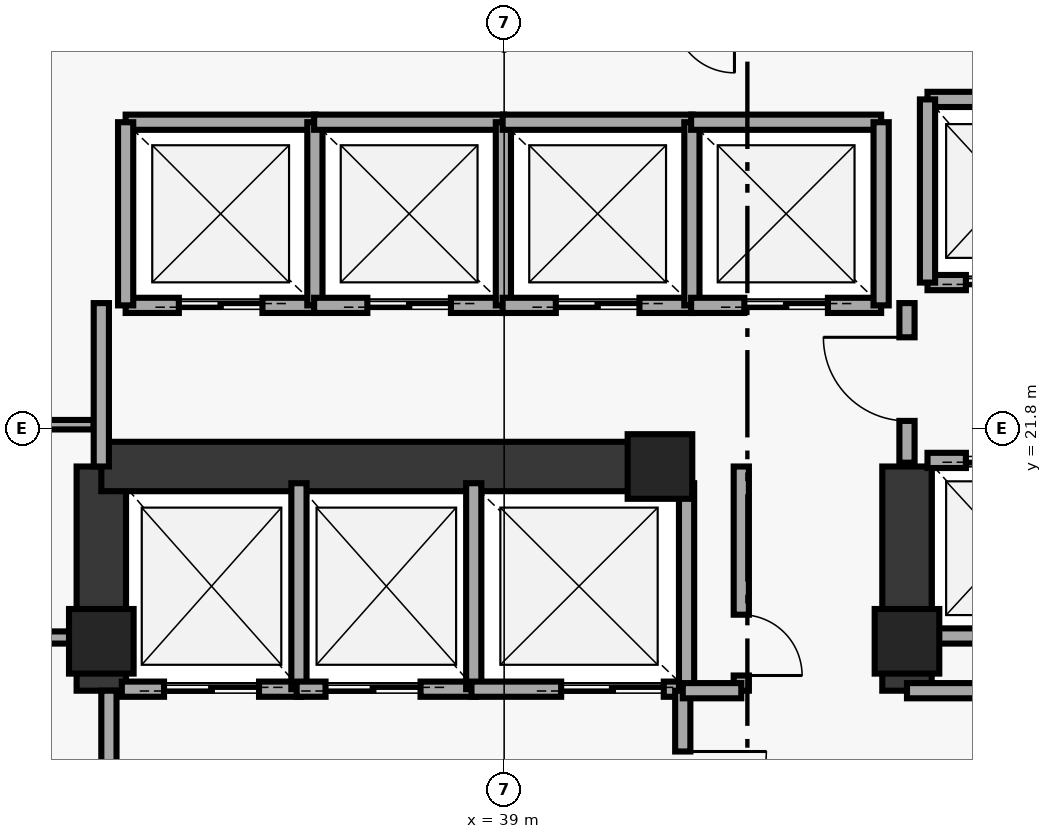
"""IFC4 building model, lengths in metres.
Left out: names, types, materials, properties, quantities, classifications, styles, units other than length and angle.
Written with IfcOpenShell. Run it as: python <this file> out.ifc"""

import sys

from ifc_helpers import new_model, si_unit, direction, frame, frame_2d, origin, origin_2d, place, context, subcontext, project, spatial, rectangle, extrude, element, fill, save


model = new_model("IFC4")
c1 = context("Model", 3, precision=1e-05, world=origin(), true_north=direction((0.0, 1.0)))
c2 = subcontext(c1, "Body", "Model", "MODEL_VIEW")
j1 = project(units=[si_unit("LENGTHUNIT", "METRE"), si_unit("PLANEANGLEUNIT", "RADIAN")], contexts=[c1])
p1 = place(None, origin())
s1 = spatial("IfcSite", under=j1, at=p1, CompositionType="ELEMENT")
p2 = place(p1, origin())
s2 = spatial("IfcBuilding", under=s1, at=p2, CompositionType="ELEMENT")
p3 = place(p2, frame((0.0, 0.0, 203.15)))
s3 = spatial("IfcBuildingStorey", under=s2, at=p3, CompositionType="ELEMENT", Elevation=203.15)
for number, where, z_axis, x_axis in (
    (1, (33.7, 19.0, 0.0), (0.0, 0.0, 1.0), (1.0, 0.0, 0.0)),
    (2, (41.05, 21.3, 0.0), (0.0, 0.0, 1.0), (1.0, 0.0, 0.0)),
    (3, (44.3, 19.0, 0.0), (0.0, 0.0, 1.0), (1.0, 0.0, 0.0)),
):
    element("IfcColumn", number, at=place(p3, frame(where, z_axis=z_axis, x_axis=x_axis)), inside=s3, PredefinedType="PILASTER", context=c2, shape_type="SweptSolid", body=[
        extrude(rectangle(XDim=0.85, YDim=0.85, at=origin_2d()), origin(), (0.0, 0.0, 1.0), 4.76),
    ])
for number, where, z_axis, x_axis in (
    (4, (33.7, 18.35, 0.0), (0.0, 0.0, 1.0), (0.0, 1.0, 0.0)),
    (5, (44.3, 18.35, 0.0), (0.0, 0.0, 1.0), (0.0, 1.0, 0.0)),
):
    element("IfcWall", number, at=place(p3, frame(where, z_axis=z_axis, x_axis=x_axis)), inside=s3, PredefinedType="SHEAR", context=c2, shape_type="SweptSolid", body=[
        extrude(rectangle(XDim=2.95, YDim=0.65, at=frame_2d((1.475, 0.0))), origin(), (0.0, 0.0, 1.0), 4.76),
    ])
p4 = place(p3, frame((33.7, 21.3, 0.0), z_axis=(0.0, 0.0, 1.0), x_axis=(1.0, 0.0, 0.0)))
e6 = element("IfcWall", 6, at=p4, inside=s3, PredefinedType="SHEAR", context=c2, shape_type="SweptSolid", body=[
    extrude(rectangle(XDim=7.55, YDim=0.65, at=frame_2d((3.775, 0.0))), origin(), (0.0, 0.0, 1.0), 4.76),
])
p5 = place(p3, frame((44.57, 23.72, 0.0), z_axis=(0.0, 0.0, 1.0), x_axis=(1.0, 0.0, 0.0)))
e7 = element("IfcWall", 7, at=p5, inside=s3, PredefinedType="SOLIDWALL", context=c2, shape_type="SweptSolid", body=[
    extrude(rectangle(XDim=2.11, YDim=0.2, at=frame_2d((1.055, 0.0))), origin(), (0.0, 0.0, 1.0), 4.76),
])
p6 = place(p5, frame((0.505, 0.0, 0.0)))
e8 = element("IfcOpeningElement", 8, at=p6, cuts=e7, PredefinedType="OPENING", context=c2, shape_type="SweptSolid", body=[
    extrude(rectangle(XDim=1.1, YDim=2.15, at=frame_2d((0.55, 1.075))), frame((0.0, 0.11, 0.0), z_axis=(0.0, -1.0, 0.0), x_axis=(1.0, 0.0, 0.0)), (0.0, 0.0, 1.0), 0.22),
])
p7 = place(p3, frame((44.57, 26.13, 0.0), z_axis=(0.0, 0.0, 1.0), x_axis=(1.0, 0.0, 0.0)))
e9 = element("IfcWall", 9, at=p7, inside=s3, PredefinedType="SOLIDWALL", context=c2, shape_type="SweptSolid", body=[
    extrude(rectangle(XDim=2.11, YDim=0.2, at=frame_2d((1.055, 0.0))), origin(), (0.0, 0.0, 1.0), 4.76),
])
p8 = place(p3, frame((44.57, 23.72, 0.0), z_axis=(0.0, 0.0, 1.0), x_axis=(0.0, 1.0, 0.0)))
e10 = element("IfcWall", 10, at=p8, inside=s3, PredefinedType="SOLIDWALL", context=c2, shape_type="SweptSolid", body=[
    extrude(rectangle(XDim=2.41, YDim=0.2, at=frame_2d((1.205, 0.0))), origin(), (0.0, 0.0, 1.0), 4.76),
])
p9 = place(p3, frame((44.57, 19.07, 0.0), z_axis=(0.0, 0.0, 1.0), x_axis=(1.0, 0.0, 0.0)))
e11 = element("IfcWall", 11, at=p9, inside=s3, PredefinedType="SOLIDWALL", context=c2, shape_type="SweptSolid", body=[
    extrude(rectangle(XDim=2.11, YDim=0.2, at=frame_2d((1.055, 0.0))), origin(), (0.0, 0.0, 1.0), 4.76),
])
p10 = place(p3, frame((44.57, 21.38, 0.0), z_axis=(0.0, 0.0, 1.0), x_axis=(1.0, 0.0, 0.0)))
e12 = element("IfcWall", 12, at=p10, inside=s3, PredefinedType="SOLIDWALL", context=c2, shape_type="SweptSolid", body=[
    extrude(rectangle(XDim=2.11, YDim=0.2, at=frame_2d((1.055, 0.0))), origin(), (0.0, 0.0, 1.0), 4.76),
])
p11 = place(p10, frame((0.505, 0.0, 0.0)))
e13 = element("IfcOpeningElement", 13, at=p11, cuts=e12, PredefinedType="OPENING", context=c2, shape_type="SweptSolid", body=[
    extrude(rectangle(XDim=1.1, YDim=2.15, at=frame_2d((0.55, 1.075))), frame((0.0, 0.11, 0.0), z_axis=(0.0, -1.0, 0.0), x_axis=(1.0, 0.0, 0.0)), (0.0, 0.0, 1.0), 0.22),
])
p12 = place(p3, frame((34.02, 23.42, 0.0), z_axis=(0.0, 0.0, 1.0), x_axis=(1.0, 0.0, 0.0)))
e14 = element("IfcWall", 14, at=p12, inside=s3, PredefinedType="SOLIDWALL", context=c2, shape_type="SweptSolid", body=[
    extrude(rectangle(XDim=2.5, YDim=0.2, at=frame_2d((1.25, 0.0))), origin(), (0.0, 0.0, 1.0), 4.76),
])
p13 = place(p12, frame((0.7, 0.0, 0.0)))
e15 = element("IfcOpeningElement", 15, at=p13, cuts=e14, PredefinedType="OPENING", context=c2, shape_type="SweptSolid", body=[
    extrude(rectangle(XDim=1.1, YDim=2.15, at=frame_2d((0.55, 1.075))), frame((0.0, 0.11, 0.0), z_axis=(0.0, -1.0, 0.0), x_axis=(1.0, 0.0, 0.0)), (0.0, 0.0, 1.0), 0.22),
])
p14 = place(p3, frame((34.02, 25.83, 0.0), z_axis=(0.0, 0.0, 1.0), x_axis=(1.0, 0.0, 0.0)))
e16 = element("IfcWall", 16, at=p14, inside=s3, PredefinedType="SOLIDWALL", context=c2, shape_type="SweptSolid", body=[
    extrude(rectangle(XDim=2.5, YDim=0.2, at=frame_2d((1.25, 0.0))), origin(), (0.0, 0.0, 1.0), 4.76),
])
for number, where, z_axis, x_axis in (
    (17, (34.02, 23.42, 0.0), (0.0, 0.0, 1.0), (0.0, 1.0, 0.0)),
    (18, (36.51, 23.42, 0.0), (0.0, 0.0, 1.0), (0.0, 1.0, 0.0)),
):
    element("IfcWall", number, at=place(p3, frame(where, z_axis=z_axis, x_axis=x_axis)), inside=s3, PredefinedType="SOLIDWALL", context=c2, shape_type="SweptSolid", body=[
        extrude(rectangle(XDim=2.41, YDim=0.2, at=frame_2d((1.205, 0.0))), origin(), (0.0, 0.0, 1.0), 4.76),
    ])
p15 = place(p3, frame((36.5, 23.42, 0.0), z_axis=(0.0, 0.0, 1.0), x_axis=(1.0, 0.0, 0.0)))
e19 = element("IfcWall", 19, at=p15, inside=s3, PredefinedType="SOLIDWALL", context=c2, shape_type="SweptSolid", body=[
    extrude(rectangle(XDim=2.5, YDim=0.2, at=frame_2d((1.25, 0.0))), origin(), (0.0, 0.0, 1.0), 4.76),
])
p16 = place(p15, frame((0.7, 0.0, 0.0)))
e20 = element("IfcOpeningElement", 20, at=p16, cuts=e19, PredefinedType="OPENING", context=c2, shape_type="SweptSolid", body=[
    extrude(rectangle(XDim=1.1, YDim=2.15, at=frame_2d((0.55, 1.075))), frame((0.0, 0.11, 0.0), z_axis=(0.0, -1.0, 0.0), x_axis=(1.0, 0.0, 0.0)), (0.0, 0.0, 1.0), 0.22),
])
p17 = place(p3, frame((36.5, 25.83, 0.0), z_axis=(0.0, 0.0, 1.0), x_axis=(1.0, 0.0, 0.0)))
e21 = element("IfcWall", 21, at=p17, inside=s3, PredefinedType="SOLIDWALL", context=c2, shape_type="SweptSolid", body=[
    extrude(rectangle(XDim=2.5, YDim=0.2, at=frame_2d((1.25, 0.0))), origin(), (0.0, 0.0, 1.0), 4.76),
])
p18 = place(p3, frame((38.99, 23.42, 0.0), z_axis=(0.0, 0.0, 1.0), x_axis=(0.0, 1.0, 0.0)))
e22 = element("IfcWall", 22, at=p18, inside=s3, PredefinedType="SOLIDWALL", context=c2, shape_type="SweptSolid", body=[
    extrude(rectangle(XDim=2.41, YDim=0.2, at=frame_2d((1.205, 0.0))), origin(), (0.0, 0.0, 1.0), 4.76),
])
p19 = place(p3, frame((38.98, 23.42, 0.0), z_axis=(0.0, 0.0, 1.0), x_axis=(1.0, 0.0, 0.0)))
e23 = element("IfcWall", 23, at=p19, inside=s3, PredefinedType="SOLIDWALL", context=c2, shape_type="SweptSolid", body=[
    extrude(rectangle(XDim=2.5, YDim=0.2, at=frame_2d((1.25, 0.0))), origin(), (0.0, 0.0, 1.0), 4.76),
])
p20 = place(p19, frame((0.7, 0.0, 0.0)))
e24 = element("IfcOpeningElement", 24, at=p20, cuts=e23, PredefinedType="OPENING", context=c2, shape_type="SweptSolid", body=[
    extrude(rectangle(XDim=1.1, YDim=2.15, at=frame_2d((0.55, 1.075))), frame((0.0, 0.11, 0.0), z_axis=(0.0, -1.0, 0.0), x_axis=(1.0, 0.0, 0.0)), (0.0, 0.0, 1.0), 0.22),
])
p21 = place(p3, frame((38.98, 25.83, 0.0), z_axis=(0.0, 0.0, 1.0), x_axis=(1.0, 0.0, 0.0)))
e25 = element("IfcWall", 25, at=p21, inside=s3, PredefinedType="SOLIDWALL", context=c2, shape_type="SweptSolid", body=[
    extrude(rectangle(XDim=2.5, YDim=0.2, at=frame_2d((1.25, 0.0))), origin(), (0.0, 0.0, 1.0), 4.76),
])
p22 = place(p3, frame((41.47, 23.42, 0.0), z_axis=(0.0, 0.0, 1.0), x_axis=(0.0, 1.0, 0.0)))
e26 = element("IfcWall", 26, at=p22, inside=s3, PredefinedType="SOLIDWALL", context=c2, shape_type="SweptSolid", body=[
    extrude(rectangle(XDim=2.41, YDim=0.2, at=frame_2d((1.205, 0.0))), origin(), (0.0, 0.0, 1.0), 4.76),
])
p23 = place(p3, frame((41.46, 23.42, 0.0), z_axis=(0.0, 0.0, 1.0), x_axis=(1.0, 0.0, 0.0)))
e27 = element("IfcWall", 27, at=p23, inside=s3, PredefinedType="SOLIDWALL", context=c2, shape_type="SweptSolid", body=[
    extrude(rectangle(XDim=2.5, YDim=0.2, at=frame_2d((1.25, 0.0))), origin(), (0.0, 0.0, 1.0), 4.76),
])
p24 = place(p23, frame((0.7, 0.0, 0.0)))
e28 = element("IfcOpeningElement", 28, at=p24, cuts=e27, PredefinedType="OPENING", context=c2, shape_type="SweptSolid", body=[
    extrude(rectangle(XDim=1.1, YDim=2.15, at=frame_2d((0.55, 1.075))), frame((0.0, 0.11, 0.0), z_axis=(0.0, -1.0, 0.0), x_axis=(1.0, 0.0, 0.0)), (0.0, 0.0, 1.0), 0.22),
])
p25 = place(p3, frame((41.46, 25.83, 0.0), z_axis=(0.0, 0.0, 1.0), x_axis=(1.0, 0.0, 0.0)))
e29 = element("IfcWall", 29, at=p25, inside=s3, PredefinedType="SOLIDWALL", context=c2, shape_type="SweptSolid", body=[
    extrude(rectangle(XDim=2.5, YDim=0.2, at=frame_2d((1.25, 0.0))), origin(), (0.0, 0.0, 1.0), 4.76),
])
p26 = place(p3, frame((43.96, 23.42, 0.0), z_axis=(0.0, 0.0, 1.0), x_axis=(0.0, 1.0, 0.0)))
e30 = element("IfcWall", 30, at=p26, inside=s3, PredefinedType="SOLIDWALL", context=c2, shape_type="SweptSolid", body=[
    extrude(rectangle(XDim=2.41, YDim=0.2, at=frame_2d((1.205, 0.0))), origin(), (0.0, 0.0, 1.0), 4.76),
])
p27 = place(p3, frame((33.97, 18.37, 0.0), z_axis=(0.0, 0.0, 1.0), x_axis=(1.0, 0.0, 0.0)))
e31 = element("IfcWall", 31, at=p27, inside=s3, PredefinedType="SOLIDWALL", context=c2, shape_type="SweptSolid", body=[
    extrude(rectangle(XDim=2.36, YDim=0.2, at=frame_2d((1.18, 0.0))), origin(), (0.0, 0.0, 1.0), 4.76),
])
p28 = place(p27, frame((0.555, 0.0, 0.0)))
e32 = element("IfcOpeningElement", 32, at=p28, cuts=e31, PredefinedType="OPENING", context=c2, shape_type="SweptSolid", body=[
    extrude(rectangle(XDim=1.25, YDim=2.2, at=frame_2d((0.625, 1.1))), frame((0.0, 0.11, 0.0), z_axis=(0.0, -1.0, 0.0), x_axis=(1.0, 0.0, 0.0)), (0.0, 0.0, 1.0), 0.22),
])
p29 = place(p3, frame((36.3, 18.37, 0.0), z_axis=(0.0, 0.0, 1.0), x_axis=(0.0, 1.0, 0.0)))
e33 = element("IfcWall", 33, at=p29, inside=s3, PredefinedType="SOLIDWALL", context=c2, shape_type="SweptSolid", body=[
    extrude(rectangle(XDim=2.71, YDim=0.2, at=frame_2d((1.355, 0.0))), origin(), (0.0, 0.0, 1.0), 4.76),
])
p30 = place(p3, frame((36.27, 18.37, 0.0), z_axis=(0.0, 0.0, 1.0), x_axis=(1.0, 0.0, 0.0)))
e34 = element("IfcWall", 34, at=p30, inside=s3, PredefinedType="SOLIDWALL", context=c2, shape_type="SweptSolid", body=[
    extrude(rectangle(XDim=2.36, YDim=0.2, at=frame_2d((1.18, 0.0))), origin(), (0.0, 0.0, 1.0), 4.76),
])
p31 = place(p30, frame((0.38, 0.0, 0.0)))
e35 = element("IfcOpeningElement", 35, at=p31, cuts=e34, PredefinedType="OPENING", context=c2, shape_type="SweptSolid", body=[
    extrude(rectangle(XDim=1.25, YDim=2.2, at=frame_2d((0.625, 1.1))), frame((0.0, 0.11, 0.0), z_axis=(0.0, -1.0, 0.0), x_axis=(1.0, 0.0, 0.0)), (0.0, 0.0, 1.0), 0.22),
])
p32 = place(p3, frame((38.6, 18.37, 0.0), z_axis=(0.0, 0.0, 1.0), x_axis=(0.0, 1.0, 0.0)))
e36 = element("IfcWall", 36, at=p32, inside=s3, PredefinedType="SOLIDWALL", context=c2, shape_type="SweptSolid", body=[
    extrude(rectangle(XDim=2.71, YDim=0.2, at=frame_2d((1.355, 0.0))), origin(), (0.0, 0.0, 1.0), 4.76),
])
p33 = place(p3, frame((38.57, 18.37, 0.0), z_axis=(0.0, 0.0, 1.0), x_axis=(1.0, 0.0, 0.0)))
e37 = element("IfcWall", 37, at=p33, inside=s3, PredefinedType="SOLIDWALL", context=c2, shape_type="SweptSolid", body=[
    extrude(rectangle(XDim=2.83, YDim=0.2, at=frame_2d((1.415, 0.0))), origin(), (0.0, 0.0, 1.0), 4.76),
])
p34 = place(p33, frame((1.18, 0.0, 0.0)))
e38 = element("IfcOpeningElement", 38, at=p34, cuts=e37, PredefinedType="OPENING", context=c2, shape_type="SweptSolid", body=[
    extrude(rectangle(XDim=1.35, YDim=2.18, at=frame_2d((0.675, 1.09))), frame((0.0, 0.11, 0.0), z_axis=(0.0, -1.0, 0.0), x_axis=(1.0, 0.0, 0.0)), (0.0, 0.0, 1.0), 0.22),
])
p35 = place(p3, frame((41.4, 18.37, 0.0), z_axis=(0.0, 0.0, 1.0), x_axis=(0.0, 1.0, 0.0)))
e39 = element("IfcWall", 39, at=p35, inside=s3, PredefinedType="SOLIDWALL", context=c2, shape_type="SweptSolid", body=[
    extrude(rectangle(XDim=2.71, YDim=0.2, at=frame_2d((1.355, 0.0))), origin(), (0.0, 0.0, 1.0), 4.76),
])
p36 = place(p3, frame((29.05, 19.05, 0.0), z_axis=(0.0, 0.0, 1.0), x_axis=(1.0, 0.0, 0.0)))
e40 = element("IfcWall", 40, at=p36, inside=s3, PredefinedType="PARTITIONING", context=c2, shape_type="SweptSolid", body=[
    extrude(rectangle(XDim=4.65, YDim=0.16, at=frame_2d((2.325, 0.0))), origin(), (0.0, 0.0, 1.0), 4.76),
])
p37 = place(p3, frame((33.6, 21.85, 0.0), z_axis=(0.0, 0.0, 1.0), x_axis=(-1.0, 0.0, 0.0)))
e41 = element("IfcWall", 41, at=p37, inside=s3, PredefinedType="PARTITIONING", context=c2, shape_type="SweptSolid", body=[
    extrude(rectangle(XDim=4.55, YDim=0.125, at=frame_2d((2.275, 0.0))), origin(), (0.0, 0.0, 1.0), 4.76),
])
p38 = place(p37, frame((3.2, 0.0, 0.0)))
e42 = element("IfcOpeningElement", 42, at=p38, cuts=e41, PredefinedType="OPENING", context=c2, shape_type="SweptSolid", body=[
    extrude(rectangle(XDim=0.8, YDim=2.05, at=frame_2d((0.4, 1.025))), frame((0.0, 0.073, 0.0), z_axis=(0.0, -1.0, 0.0), x_axis=(1.0, 0.0, 0.0)), (0.0, 0.0, 1.0), 0.145),
])
p39 = place(p37, frame((1.0, 0.0, 0.0)))
e43 = element("IfcOpeningElement", 43, at=p39, cuts=e41, PredefinedType="OPENING", context=c2, shape_type="SweptSolid", body=[
    extrude(rectangle(XDim=0.8, YDim=2.05, at=frame_2d((0.4, 1.025))), frame((0.0, 0.073, 0.0), z_axis=(0.0, -1.0, 0.0), x_axis=(1.0, 0.0, 0.0)), (0.0, 0.0, 1.0), 0.145),
])
p40 = place(p3, frame((33.7, 21.3, 0.0), z_axis=(0.0, 0.0, 1.0), x_axis=(0.0, 1.0, 0.0)))
e44 = element("IfcWall", 44, at=p40, inside=s3, PredefinedType="SOLIDWALL", context=c2, shape_type="SweptSolid", body=[
    extrude(rectangle(XDim=2.15, YDim=0.2, at=frame_2d((1.075, 0.0))), origin(), (0.0, 0.0, 1.0), 4.145),
])
p41 = place(p3, frame((44.3, 21.35, 0.0), z_axis=(0.0, 0.0, 1.0), x_axis=(0.0, 1.0, 0.0)))
e45 = element("IfcWall", 45, at=p41, inside=s3, PredefinedType="SOLIDWALL", context=c2, shape_type="SweptSolid", body=[
    extrude(rectangle(XDim=2.1, YDim=0.2, at=frame_2d((1.05, 0.0))), origin(), (0.0, 0.0, 1.0), 4.145),
])
p42 = place(p41, frame((0.55, 0.0, 0.0)))
e46 = element("IfcOpeningElement", 46, at=p42, cuts=e45, PredefinedType="OPENING", context=c2, shape_type="SweptSolid", body=[
    extrude(rectangle(XDim=1.1, YDim=2.15, at=frame_2d((0.55, 1.075))), frame((0.0, 0.11, 0.0), z_axis=(0.0, -1.0, 0.0), x_axis=(1.0, 0.0, 0.0)), (0.0, 0.0, 1.0), 0.22),
])
p43 = place(p3, frame((33.8, 15.55, 0.0), z_axis=(0.0, 0.0, 1.0), x_axis=(0.0, 1.0, 0.0)))
e47 = element("IfcWall", 47, at=p43, inside=s3, PredefinedType="SOLIDWALL", context=c2, shape_type="SweptSolid", body=[
    extrude(rectangle(XDim=2.8, YDim=0.2, at=frame_2d((1.4, 0.0))), origin(), (0.0, 0.0, 1.0), 4.76),
])
p44 = place(p3, frame((41.35, 15.55, 0.0), z_axis=(0.0, 0.0, 1.0), x_axis=(0.0, 1.0, 0.0)))
e48 = element("IfcWall", 48, at=p44, inside=s3, PredefinedType="SOLIDWALL", context=c2, shape_type="SweptSolid", body=[
    extrude(rectangle(XDim=2.8, YDim=0.2, at=frame_2d((1.4, 0.0))), origin(), (0.0, 0.0, 1.0), 4.76),
])
p45 = place(p44, frame((0.9, 0.0, 0.0)))
e49 = element("IfcOpeningElement", 49, at=p45, cuts=e48, PredefinedType="OPENING", context=c2, shape_type="SweptSolid", body=[
    extrude(rectangle(XDim=1.1, YDim=2.15, at=frame_2d((0.55, 1.075))), frame((0.0, 0.11, 0.0), z_axis=(0.0, -1.0, 0.0), x_axis=(1.0, 0.0, 0.0)), (0.0, 0.0, 1.0), 0.22),
])
p46 = place(p3, frame((44.3, 18.35, 0.0), z_axis=(0.0, 0.0, 1.0), x_axis=(1.0, 0.0, 0.0)))
e50 = element("IfcWall", 50, at=p46, inside=s3, PredefinedType="SOLIDWALL", context=c2, shape_type="SweptSolid", body=[
    extrude(rectangle(XDim=1.55, YDim=0.2, at=frame_2d((0.775, 0.0))), origin(), (0.0, 0.0, 1.0), 4.76),
])
p47 = place(p3, frame((42.12, 18.35, 0.0), z_axis=(0.0, 0.0, 1.0), x_axis=(0.0, 1.0, 0.0)))
e51 = element("IfcWall", 51, at=p47, inside=s3, PredefinedType="SOLIDWALL", context=c2, shape_type="SweptSolid", body=[
    extrude(rectangle(XDim=2.95, YDim=0.2, at=frame_2d((1.475, 0.0))), origin(), (0.0, 0.0, 1.0), 4.76),
])
p48 = place(p47, frame((0.2, 0.0, 0.0)))
e52 = element("IfcOpeningElement", 52, at=p48, cuts=e51, PredefinedType="OPENING", context=c2, shape_type="SweptSolid", body=[
    extrude(rectangle(XDim=0.8, YDim=2.05, at=frame_2d((0.4, 1.025))), frame((0.0, 0.11, 0.0), z_axis=(0.0, -1.0, 0.0), x_axis=(1.0, 0.0, 0.0)), (0.0, 0.0, 1.0), 0.22),
])
p49 = place(p3, frame((41.35, 18.35, 0.0), z_axis=(0.0, 0.0, 1.0), x_axis=(1.0, 0.0, 0.0)))
e53 = element("IfcWall", 53, at=p49, inside=s3, PredefinedType="SOLIDWALL", context=c2, shape_type="SweptSolid", body=[
    extrude(rectangle(XDim=0.77, YDim=0.2, at=frame_2d((0.385, 0.0))), origin(), (0.0, 0.0, 1.0), 4.76),
])
p50 = place(p6, origin())
e54 = element("IfcDoor", 54, at=p50, inside=s3, OperationType="DOUBLE_DOOR_SLIDING", PredefinedType="DOOR", context=c2, shape_type="SweptSolid", body=[
    extrude(rectangle(XDim=1.1, YDim=2.15, at=frame_2d((0.55, 1.075))), frame((0.0, 0.025, 0.0), z_axis=(0.0, -1.0, 0.0), x_axis=(1.0, 0.0, 0.0)), (0.0, 0.0, 1.0), 0.05),
])
fill(e8, e54)
p51 = place(p11, origin())
e55 = element("IfcDoor", 55, at=p51, inside=s3, OperationType="DOUBLE_DOOR_SLIDING", PredefinedType="DOOR", context=c2, shape_type="SweptSolid", body=[
    extrude(rectangle(XDim=1.1, YDim=2.15, at=frame_2d((0.55, 1.075))), frame((0.0, 0.025, 0.0), z_axis=(0.0, -1.0, 0.0), x_axis=(1.0, 0.0, 0.0)), (0.0, 0.0, 1.0), 0.05),
])
fill(e13, e55)
p52 = place(p13, origin())
e56 = element("IfcDoor", 56, at=p52, inside=s3, OperationType="DOUBLE_DOOR_SLIDING", PredefinedType="DOOR", context=c2, shape_type="SweptSolid", body=[
    extrude(rectangle(XDim=1.1, YDim=2.15, at=frame_2d((0.55, 1.075))), frame((0.0, 0.025, 0.0), z_axis=(0.0, -1.0, 0.0), x_axis=(1.0, 0.0, 0.0)), (0.0, 0.0, 1.0), 0.05),
])
fill(e15, e56)
p53 = place(p16, origin())
e57 = element("IfcDoor", 57, at=p53, inside=s3, OperationType="DOUBLE_DOOR_SLIDING", PredefinedType="DOOR", context=c2, shape_type="SweptSolid", body=[
    extrude(rectangle(XDim=1.1, YDim=2.15, at=frame_2d((0.55, 1.075))), frame((0.0, 0.025, 0.0), z_axis=(0.0, -1.0, 0.0), x_axis=(1.0, 0.0, 0.0)), (0.0, 0.0, 1.0), 0.05),
])
fill(e20, e57)
p54 = place(p20, origin())
e58 = element("IfcDoor", 58, at=p54, inside=s3, OperationType="DOUBLE_DOOR_SLIDING", PredefinedType="DOOR", context=c2, shape_type="SweptSolid", body=[
    extrude(rectangle(XDim=1.1, YDim=2.15, at=frame_2d((0.55, 1.075))), frame((0.0, 0.025, 0.0), z_axis=(0.0, -1.0, 0.0), x_axis=(1.0, 0.0, 0.0)), (0.0, 0.0, 1.0), 0.05),
])
fill(e24, e58)
p55 = place(p24, origin())
e59 = element("IfcDoor", 59, at=p55, inside=s3, OperationType="DOUBLE_DOOR_SLIDING", PredefinedType="DOOR", context=c2, shape_type="SweptSolid", body=[
    extrude(rectangle(XDim=1.1, YDim=2.15, at=frame_2d((0.55, 1.075))), frame((0.0, 0.025, 0.0), z_axis=(0.0, -1.0, 0.0), x_axis=(1.0, 0.0, 0.0)), (0.0, 0.0, 1.0), 0.05),
])
fill(e28, e59)
p56 = place(p28, origin())
e60 = element("IfcDoor", 60, at=p56, inside=s3, OperationType="DOUBLE_DOOR_SLIDING", PredefinedType="DOOR", context=c2, shape_type="SweptSolid", body=[
    extrude(rectangle(XDim=1.25, YDim=2.2, at=frame_2d((0.625, 1.1))), frame((0.0, 0.025, 0.0), z_axis=(0.0, -1.0, 0.0), x_axis=(1.0, 0.0, 0.0)), (0.0, 0.0, 1.0), 0.05),
])
fill(e32, e60)
p57 = place(p31, origin())
e61 = element("IfcDoor", 61, at=p57, inside=s3, OperationType="DOUBLE_DOOR_SLIDING", PredefinedType="DOOR", context=c2, shape_type="SweptSolid", body=[
    extrude(rectangle(XDim=1.25, YDim=2.2, at=frame_2d((0.625, 1.1))), frame((0.0, 0.025, 0.0), z_axis=(0.0, -1.0, 0.0), x_axis=(1.0, 0.0, 0.0)), (0.0, 0.0, 1.0), 0.05),
])
fill(e35, e61)
p58 = place(p34, origin())
e62 = element("IfcDoor", 62, at=p58, inside=s3, OperationType="DOUBLE_DOOR_SLIDING", PredefinedType="DOOR", context=c2, shape_type="SweptSolid", body=[
    extrude(rectangle(XDim=1.35, YDim=2.18, at=frame_2d((0.675, 1.09))), frame((0.0, 0.025, 0.0), z_axis=(0.0, -1.0, 0.0), x_axis=(1.0, 0.0, 0.0)), (0.0, 0.0, 1.0), 0.05),
])
fill(e38, e62)
p59 = place(p42, origin())
e63 = element("IfcDoor", 63, at=p59, inside=s3, OperationType="SINGLE_SWING_RIGHT", PredefinedType="DOOR", context=c2, shape_type="SweptSolid", body=[
    extrude(rectangle(XDim=1.1, YDim=2.15, at=frame_2d((0.55, 1.075))), frame((0.0, 0.025, 0.0), z_axis=(0.0, -1.0, 0.0), x_axis=(1.0, 0.0, 0.0)), (0.0, 0.0, 1.0), 0.05),
])
fill(e46, e63)
p60 = place(p45, origin())
e64 = element("IfcDoor", 64, at=p60, inside=s3, OperationType="SINGLE_SWING_RIGHT", PredefinedType="DOOR", context=c2, shape_type="SweptSolid", body=[
    extrude(rectangle(XDim=1.1, YDim=2.15, at=frame_2d((0.55, 1.075))), frame((0.0, 0.025, 0.0), z_axis=(0.0, -1.0, 0.0), x_axis=(1.0, 0.0, 0.0)), (0.0, 0.0, 1.0), 0.05),
])
fill(e49, e64)
p61 = place(p48, origin())
e65 = element("IfcDoor", 65, at=p61, inside=s3, OperationType="SINGLE_SWING_LEFT", PredefinedType="DOOR", context=c2, shape_type="SweptSolid", body=[
    extrude(rectangle(XDim=0.8, YDim=2.05, at=frame_2d((0.4, 1.025))), frame((0.0, 0.025, 0.0), z_axis=(0.0, -1.0, 0.0), x_axis=(1.0, 0.0, 0.0)), (0.0, 0.0, 1.0), 0.05),
])
fill(e52, e65)
save(model, sys.argv[1])
